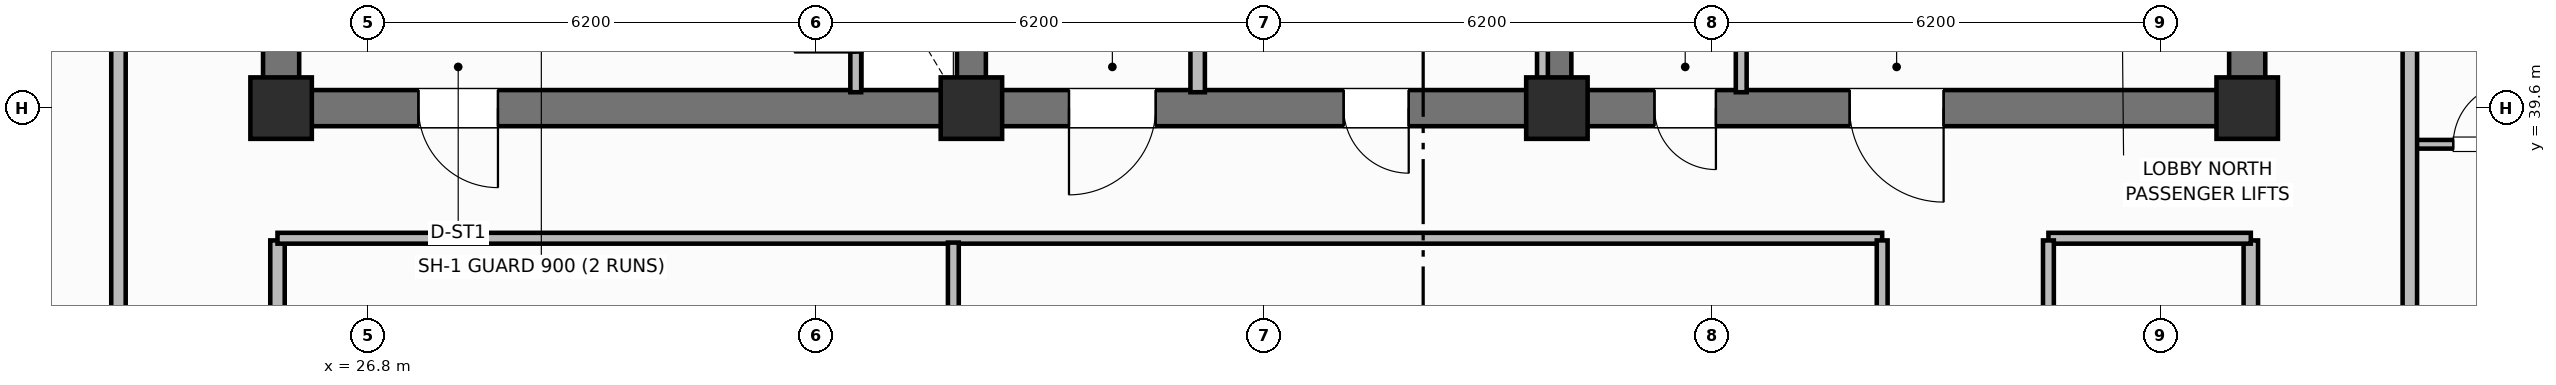
"""IFC4 building model, lengths in metres.
Left out: names, types, materials, properties, quantities, classifications, styles, units other than length and angle.
Written with IfcOpenShell. Run it as: python <this file> out.ifc"""

import sys

from ifc_helpers import new_model, si_unit, direction, frame, frame_2d, origin, origin_2d, place, context, subcontext, project, spatial, rectangle, extrude, element, fill, save


model = new_model("IFC4")
c1 = context("Model", 3, precision=1e-05, world=origin(), true_north=direction((0.0, 1.0)))
c2 = subcontext(c1, "Body", "Model", "MODEL_VIEW")
j1 = project(units=[si_unit("LENGTHUNIT", "METRE"), si_unit("PLANEANGLEUNIT", "RADIAN")], contexts=[c1])
p1 = place(None, origin())
s1 = spatial("IfcSite", under=j1, at=p1, CompositionType="ELEMENT")
p2 = place(p1, origin())
s2 = spatial("IfcBuilding", under=s1, at=p2, CompositionType="ELEMENT")
p3 = place(p2, frame((0.0, 0.0, 214.7)))
s3 = spatial("IfcBuildingStorey", under=s2, at=p3, CompositionType="ELEMENT", Elevation=214.7)
for number, where, z_axis, x_axis in (
    (1, (25.6, 39.85, 0.0), (0.0, 0.0, 1.0), (0.0, 1.0, 0.0)),
    (2, (52.8, 39.85, 0.0), (0.0, 0.0, 1.0), (0.0, 1.0, 0.0)),
):
    element("IfcWall", number, at=place(p3, frame(where, z_axis=z_axis, x_axis=x_axis)), inside=s3, PredefinedType="SHEAR", context=c2, shape_type="SweptSolid", body=[
        extrude(rectangle(XDim=5.7, YDim=0.5, at=frame_2d((2.85, 0.0))), origin(), (0.0, 0.0, 1.0), 3.7),
    ])
p4 = place(p3, frame((52.8, 39.6, 0.0), z_axis=(0.0, 0.0, 1.0), x_axis=(-1.0, 0.0, 0.0)))
e3 = element("IfcWall", 3, at=p4, inside=s3, PredefinedType="SHEAR", context=c2, shape_type="SweptSolid", body=[
    extrude(rectangle(XDim=27.2, YDim=0.5, at=frame_2d((13.6, 0.0))), origin(), (0.0, 0.0, 1.0), 3.7),
])
p5 = place(p4, frame((24.2, 0.0, 0.0)))
e4 = element("IfcOpeningElement", 4, at=p5, cuts=e3, PredefinedType="OPENING", context=c2, shape_type="SweptSolid", body=[
    extrude(rectangle(XDim=1.1, YDim=2.15, at=frame_2d((0.55, 1.075))), frame((0.0, 0.26, 0.0), z_axis=(0.0, -1.0, 0.0), x_axis=(1.0, 0.0, 0.0)), (0.0, 0.0, 1.0), 0.52),
])
p6 = place(p4, frame((15.1, 0.0, 0.0)))
e5 = element("IfcOpeningElement", 5, at=p6, cuts=e3, PredefinedType="OPENING", context=c2, shape_type="SweptSolid", body=[
    extrude(rectangle(XDim=1.2, YDim=2.15, at=frame_2d((0.6, 1.075))), frame((0.0, 0.26, 0.0), z_axis=(0.0, -1.0, 0.0), x_axis=(1.0, 0.0, 0.0)), (0.0, 0.0, 1.0), 0.52),
])
p7 = place(p4, frame((11.6, 0.0, 0.0)))
e6 = element("IfcOpeningElement", 6, at=p7, cuts=e3, PredefinedType="OPENING", context=c2, shape_type="SweptSolid", body=[
    extrude(rectangle(XDim=0.9, YDim=2.1, at=frame_2d((0.45, 1.05))), frame((0.0, 0.26, 0.0), z_axis=(0.0, -1.0, 0.0), x_axis=(1.0, 0.0, 0.0)), (0.0, 0.0, 1.0), 0.52),
])
p8 = place(p4, frame((7.35, 0.0, 0.0)))
e7 = element("IfcOpeningElement", 7, at=p8, cuts=e3, PredefinedType="OPENING", context=c2, shape_type="SweptSolid", body=[
    extrude(rectangle(XDim=0.85, YDim=2.1, at=frame_2d((0.425, 1.05))), frame((0.0, 0.26, 0.0), z_axis=(0.0, -1.0, 0.0), x_axis=(1.0, 0.0, 0.0)), (0.0, 0.0, 1.0), 0.52),
])
p9 = place(p4, frame((4.2, 0.0, 0.0)))
e8 = element("IfcOpeningElement", 8, at=p9, cuts=e3, PredefinedType="OPENING", context=c2, shape_type="SweptSolid", body=[
    extrude(rectangle(XDim=1.3, YDim=2.2, at=frame_2d((0.65, 1.1))), frame((0.0, 0.26, 0.0), z_axis=(0.0, -1.0, 0.0), x_axis=(1.0, 0.0, 0.0)), (0.0, 0.0, 1.0), 0.52),
])
for number, where, z_axis, x_axis in (
    (9, (35.15, 39.85, 0.0), (0.0, 0.0, 1.0), (0.0, 1.0, 0.0)),
    (10, (43.25, 39.85, 0.0), (0.0, 0.0, 1.0), (0.0, 1.0, 0.0)),
):
    element("IfcWall", number, at=place(p3, frame(where, z_axis=z_axis, x_axis=x_axis)), inside=s3, PredefinedType="SHEAR", context=c2, shape_type="SweptSolid", body=[
        extrude(rectangle(XDim=5.7, YDim=0.4, at=frame_2d((2.85, 0.0))), origin(), (0.0, 0.0, 1.0), 3.7),
    ])
for number, where, z_axis, x_axis in (
    (11, (25.6, 39.6, 0.0), (0.0, 0.0, 1.0), (1.0, 0.0, 0.0)),
    (12, (35.15, 39.6, 0.0), (0.0, 0.0, 1.0), (1.0, 0.0, 0.0)),
    (13, (43.25, 39.6, 0.0), (0.0, 0.0, 1.0), (1.0, 0.0, 0.0)),
    (14, (52.8, 39.6, 0.0), (0.0, 0.0, 1.0), (1.0, 0.0, 0.0)),
):
    element("IfcColumn", number, at=place(p3, frame(where, z_axis=z_axis, x_axis=x_axis)), inside=s3, PredefinedType="COLUMN", context=c2, shape_type="SweptSolid", body=[
        extrude(rectangle(XDim=0.85, YDim=0.85, at=origin_2d()), origin(), (0.0, 0.0, 1.0), 3.7),
    ])
p10 = place(p3, frame((33.55, 39.82, 0.0), z_axis=(0.0, 0.0, 1.0), x_axis=(0.0, 1.0, 0.0)))
e15 = element("IfcWall", 15, at=p10, inside=s3, PredefinedType="PARTITIONING", context=c2, shape_type="SweptSolid", body=[
    extrude(rectangle(XDim=2.13, YDim=0.15, at=frame_2d((1.065, 0.0))), origin(), (0.0, 0.0, 1.0), 2.55),
])
p11 = place(p10, frame((0.55, 0.0, 0.0)))
e16 = element("IfcOpeningElement", 16, at=p11, cuts=e15, PredefinedType="OPENING", context=c2, shape_type="SweptSolid", body=[
    extrude(rectangle(XDim=0.85, YDim=2.05, at=frame_2d((0.425, 1.025))), frame((0.0, 0.085, 0.0), z_axis=(0.0, -1.0, 0.0), x_axis=(1.0, 0.0, 0.0)), (0.0, 0.0, 1.0), 0.17),
])
p12 = place(p3, frame((38.28, 39.82, 0.0), z_axis=(0.0, 0.0, 1.0), x_axis=(0.0, 1.0, 0.0)))
e17 = element("IfcWall", 17, at=p12, inside=s3, PredefinedType="PARTITIONING", context=c2, shape_type="SweptSolid", body=[
    extrude(rectangle(XDim=5.63, YDim=0.2, at=frame_2d((2.815, 0.0))), origin(), (0.0, 0.0, 1.0), 2.55),
])
for number, where, z_axis, x_axis in (
    (18, (43.05, 39.82, 0.0), (0.0, 0.0, 1.0), (0.0, 1.0, 0.0)),
    (19, (45.8, 39.82, 0.0), (0.0, 0.0, 1.0), (0.0, 1.0, 0.0)),
):
    element("IfcWall", number, at=place(p3, frame(where, z_axis=z_axis, x_axis=x_axis)), inside=s3, PredefinedType="PARTITIONING", context=c2, shape_type="SweptSolid", body=[
        extrude(rectangle(XDim=5.63, YDim=0.15, at=frame_2d((2.815, 0.0))), origin(), (0.0, 0.0, 1.0), 2.55),
    ])
for number, where, z_axis, x_axis in (
    (20, (25.55, 18.63, 0.0), (0.0, 0.0, 1.0), (0.0, 1.0, 0.0)),
    (21, (52.85, 18.63, 0.0), (0.0, 0.0, 1.0), (0.0, 1.0, 0.0)),
):
    element("IfcWall", number, at=place(p3, frame(where, z_axis=z_axis, x_axis=x_axis)), inside=s3, PredefinedType="PARTITIONING", context=c2, shape_type="SweptSolid", body=[
        extrude(rectangle(XDim=19.14, YDim=0.2, at=frame_2d((9.57, 0.0))), origin(), (0.0, 0.0, 1.0), 2.55),
    ])
p13 = place(p3, frame((25.55, 37.8, 0.0), z_axis=(0.0, 0.0, 1.0), x_axis=(1.0, 0.0, 0.0)))
e22 = element("IfcWall", 22, at=p13, inside=s3, PredefinedType="PARTITIONING", context=c2, shape_type="SweptSolid", body=[
    extrude(rectangle(XDim=22.2, YDim=0.15, at=frame_2d((11.1, 0.0))), origin(), (0.0, 0.0, 1.0), 2.55),
])
p14 = place(p3, frame((50.05, 37.8, 0.0), z_axis=(0.0, 0.0, 1.0), x_axis=(1.0, 0.0, 0.0)))
e23 = element("IfcWall", 23, at=p14, inside=s3, PredefinedType="PARTITIONING", context=c2, shape_type="SweptSolid", body=[
    extrude(rectangle(XDim=2.8, YDim=0.15, at=frame_2d((1.4, 0.0))), origin(), (0.0, 0.0, 1.0), 2.55),
])
p15 = place(p3, frame((34.9, 18.66, 0.0), z_axis=(0.0, 0.0, 1.0), x_axis=(0.0, 1.0, 0.0)))
e24 = element("IfcWall", 24, at=p15, inside=s3, PredefinedType="PARTITIONING", context=c2, shape_type="SweptSolid", body=[
    extrude(rectangle(XDim=19.08, YDim=0.15, at=frame_2d((9.54, 0.0))), origin(), (0.0, 0.0, 1.0), 2.55),
])
p16 = place(p15, frame((5.0, 0.0, 0.0)))
e25 = element("IfcOpeningElement", 25, at=p16, cuts=e24, PredefinedType="OPENING", context=c2, shape_type="SweptSolid", body=[
    extrude(rectangle(XDim=1.0, YDim=2.15, at=frame_2d((0.5, 1.075))), frame((0.0, 0.085, 0.0), z_axis=(0.0, -1.0, 0.0), x_axis=(1.0, 0.0, 0.0)), (0.0, 0.0, 1.0), 0.17),
])
p17 = place(p3, frame((47.75, 18.63, 0.0), z_axis=(0.0, 0.0, 1.0), x_axis=(0.0, 1.0, 0.0)))
e26 = element("IfcWall", 26, at=p17, inside=s3, PredefinedType="PARTITIONING", context=c2, shape_type="SweptSolid", body=[
    extrude(rectangle(XDim=19.14, YDim=0.15, at=frame_2d((9.57, 0.0))), origin(), (0.0, 0.0, 1.0), 2.55),
])
p18 = place(p17, frame((2.4, 0.0, 0.0)))
e27 = element("IfcOpeningElement", 27, at=p18, cuts=e26, PredefinedType="OPENING", context=c2, shape_type="SweptSolid", body=[
    extrude(rectangle(XDim=0.9, YDim=2.1, at=frame_2d((0.45, 1.05))), frame((0.0, 0.085, 0.0), z_axis=(0.0, -1.0, 0.0), x_axis=(1.0, 0.0, 0.0)), (0.0, 0.0, 1.0), 0.17),
])
p19 = place(p17, frame((9.847, 0.0, 0.0)))
e28 = element("IfcOpeningElement", 28, at=p19, cuts=e26, PredefinedType="OPENING", context=c2, shape_type="SweptSolid", body=[
    extrude(rectangle(XDim=0.9, YDim=2.1, at=frame_2d((0.45, 1.05))), frame((0.0, 0.085, 0.0), z_axis=(0.0, -1.0, 0.0), x_axis=(1.0, 0.0, 0.0)), (0.0, 0.0, 1.0), 0.17),
])
p20 = place(p3, frame((50.05, 18.63, 0.0), z_axis=(0.0, 0.0, 1.0), x_axis=(0.0, 1.0, 0.0)))
e29 = element("IfcWall", 29, at=p20, inside=s3, PredefinedType="PARTITIONING", context=c2, shape_type="SweptSolid", body=[
    extrude(rectangle(XDim=19.14, YDim=0.15, at=frame_2d((9.57, 0.0))), origin(), (0.0, 0.0, 1.0), 2.55),
])
p21 = place(p20, frame((2.2, 0.0, 0.0)))
e30 = element("IfcOpeningElement", 30, at=p21, cuts=e29, PredefinedType="OPENING", context=c2, shape_type="SweptSolid", body=[
    extrude(rectangle(XDim=1.0, YDim=2.15, at=frame_2d((0.5, 1.075))), frame((0.0, 0.085, 0.0), z_axis=(0.0, -1.0, 0.0), x_axis=(1.0, 0.0, 0.0)), (0.0, 0.0, 1.0), 0.17),
])
p22 = place(p20, frame((9.847, 0.0, 0.0)))
e31 = element("IfcOpeningElement", 31, at=p22, cuts=e29, PredefinedType="OPENING", context=c2, shape_type="SweptSolid", body=[
    extrude(rectangle(XDim=1.0, YDim=2.15, at=frame_2d((0.5, 1.075))), frame((0.0, 0.085, 0.0), z_axis=(0.0, -1.0, 0.0), x_axis=(1.0, 0.0, 0.0)), (0.0, 0.0, 1.0), 0.17),
])
p23 = place(p3, frame((23.35, 10.6, 0.0), z_axis=(0.0, 0.0, 1.0), x_axis=(0.0, 1.0, 0.0)))
e32 = element("IfcWall", 32, at=p23, inside=s3, PredefinedType="PARTITIONING", context=c2, shape_type="SweptSolid", body=[
    extrude(rectangle(XDim=35.2, YDim=0.2, at=frame_2d((17.6, 0.0))), origin(), (0.0, 0.0, 1.0), 2.55),
])
p24 = place(p23, frame((2.65, 0.0, 0.0)))
e33 = element("IfcOpeningElement", 33, at=p24, cuts=e32, PredefinedType="OPENING", context=c2, shape_type="SweptSolid", body=[
    extrude(rectangle(XDim=1.0, YDim=2.15, at=frame_2d((0.5, 1.075))), frame((0.0, 0.11, 0.0), z_axis=(0.0, -1.0, 0.0), x_axis=(1.0, 0.0, 0.0)), (0.0, 0.0, 1.0), 0.22),
])
p25 = place(p23, frame((19.79, 0.0, 0.0)))
e34 = element("IfcOpeningElement", 34, at=p25, cuts=e32, PredefinedType="OPENING", context=c2, shape_type="SweptSolid", body=[
    extrude(rectangle(XDim=1.0, YDim=2.15, at=frame_2d((0.5, 1.075))), frame((0.0, 0.11, 0.0), z_axis=(0.0, -1.0, 0.0), x_axis=(1.0, 0.0, 0.0)), (0.0, 0.0, 1.0), 0.22),
])
p26 = place(p3, frame((55.05, 39.1, 0.0), z_axis=(0.0, 0.0, 1.0), x_axis=(1.0, 0.0, 0.0)))
e35 = element("IfcWall", 35, at=p26, inside=s3, PredefinedType="PARTITIONING", context=c2, shape_type="SweptSolid", body=[
    extrude(rectangle(XDim=2.25, YDim=0.12, at=frame_2d((1.125, 0.0))), origin(), (0.0, 0.0, 1.0), 2.55),
])
p27 = place(p26, frame((0.6, 0.0, 0.0)))
e36 = element("IfcOpeningElement", 36, at=p27, cuts=e35, PredefinedType="OPENING", context=c2, shape_type="SweptSolid", body=[
    extrude(rectangle(XDim=0.85, YDim=2.1, at=frame_2d((0.425, 1.05))), frame((0.0, 0.07, 0.0), z_axis=(0.0, -1.0, 0.0), x_axis=(1.0, 0.0, 0.0)), (0.0, 0.0, 1.0), 0.14),
])
p28 = place(p3, frame((55.05, 10.6, 0.0), z_axis=(0.0, 0.0, 1.0), x_axis=(0.0, 1.0, 0.0)))
e37 = element("IfcWall", 37, at=p28, inside=s3, PredefinedType="PARTITIONING", context=c2, shape_type="SweptSolid", body=[
    extrude(rectangle(XDim=35.2, YDim=0.2, at=frame_2d((17.6, 0.0))), origin(), (0.0, 0.0, 1.0), 2.55),
])
p29 = place(p28, frame((2.65, 0.0, 0.0)))
e38 = element("IfcOpeningElement", 38, at=p29, cuts=e37, PredefinedType="OPENING", context=c2, shape_type="SweptSolid", body=[
    extrude(rectangle(XDim=1.0, YDim=2.15, at=frame_2d((0.5, 1.075))), frame((0.0, 0.11, 0.0), z_axis=(0.0, -1.0, 0.0), x_axis=(1.0, 0.0, 0.0)), (0.0, 0.0, 1.0), 0.22),
])
p30 = place(p28, frame((12.166, 0.0, 0.0)))
e39 = element("IfcOpeningElement", 39, at=p30, cuts=e37, PredefinedType="OPENING", context=c2, shape_type="SweptSolid", body=[
    extrude(rectangle(XDim=1.0, YDim=2.15, at=frame_2d((0.5, 1.075))), frame((0.0, 0.11, 0.0), z_axis=(0.0, -1.0, 0.0), x_axis=(1.0, 0.0, 0.0)), (0.0, 0.0, 1.0), 0.22),
])
p31 = place(p28, frame((23.65, 0.0, 0.0)))
e40 = element("IfcOpeningElement", 40, at=p31, cuts=e37, PredefinedType="OPENING", context=c2, shape_type="SweptSolid", body=[
    extrude(rectangle(XDim=1.0, YDim=2.15, at=frame_2d((0.5, 1.075))), frame((0.0, 0.11, 0.0), z_axis=(0.0, -1.0, 0.0), x_axis=(1.0, 0.0, 0.0)), (0.0, 0.0, 1.0), 0.22),
])
p32 = place(p11, origin())
e41 = element("IfcDoor", 41, at=p32, inside=s3, OperationType="SINGLE_SWING_LEFT", PredefinedType="TRAPDOOR", context=c2, shape_type="SweptSolid", body=[
    extrude(rectangle(XDim=0.85, YDim=2.05, at=frame_2d((0.425, 1.025))), frame((0.0, 0.025, 0.0), z_axis=(0.0, -1.0, 0.0), x_axis=(1.0, 0.0, 0.0)), (0.0, 0.0, 1.0), 0.05),
])
fill(e16, e41)
p33 = place(p27, origin())
e42 = element("IfcDoor", 42, at=p33, inside=s3, OperationType="SINGLE_SWING_RIGHT", PredefinedType="DOOR", context=c2, shape_type="SweptSolid", body=[
    extrude(rectangle(XDim=0.85, YDim=2.1, at=frame_2d((0.425, 1.05))), frame((0.0, 0.025, 0.0), z_axis=(0.0, -1.0, 0.0), x_axis=(1.0, 0.0, 0.0)), (0.0, 0.0, 1.0), 0.05),
])
fill(e36, e42)
p34 = place(p5, origin())
e43 = element("IfcDoor", 43, at=p34, inside=s3, OperationType="SINGLE_SWING_LEFT", PredefinedType="DOOR", context=c2, shape_type="SweptSolid", body=[
    extrude(rectangle(XDim=1.1, YDim=2.15, at=frame_2d((0.55, 1.075))), frame((0.0, 0.025, 0.0), z_axis=(0.0, -1.0, 0.0), x_axis=(1.0, 0.0, 0.0)), (0.0, 0.0, 1.0), 0.05),
])
fill(e4, e43)
p35 = place(p6, origin())
e44 = element("IfcDoor", 44, at=p35, inside=s3, OperationType="SINGLE_SWING_RIGHT", PredefinedType="DOOR", context=c2, shape_type="SweptSolid", body=[
    extrude(rectangle(XDim=1.2, YDim=2.15, at=frame_2d((0.6, 1.075))), frame((0.0, 0.025, 0.0), z_axis=(0.0, -1.0, 0.0), x_axis=(1.0, 0.0, 0.0)), (0.0, 0.0, 1.0), 0.05),
])
fill(e5, e44)
p36 = place(p7, origin())
e45 = element("IfcDoor", 45, at=p36, inside=s3, OperationType="SINGLE_SWING_LEFT", PredefinedType="DOOR", context=c2, shape_type="SweptSolid", body=[
    extrude(rectangle(XDim=0.9, YDim=2.1, at=frame_2d((0.45, 1.05))), frame((0.0, 0.025, 0.0), z_axis=(0.0, -1.0, 0.0), x_axis=(1.0, 0.0, 0.0)), (0.0, 0.0, 1.0), 0.05),
])
fill(e6, e45)
p37 = place(p8, origin())
e46 = element("IfcDoor", 46, at=p37, inside=s3, OperationType="SINGLE_SWING_LEFT", PredefinedType="DOOR", context=c2, shape_type="SweptSolid", body=[
    extrude(rectangle(XDim=0.85, YDim=2.1, at=frame_2d((0.425, 1.05))), frame((0.0, 0.025, 0.0), z_axis=(0.0, -1.0, 0.0), x_axis=(1.0, 0.0, 0.0)), (0.0, 0.0, 1.0), 0.05),
])
fill(e7, e46)
p38 = place(p9, origin())
e47 = element("IfcDoor", 47, at=p38, inside=s3, OperationType="SINGLE_SWING_LEFT", PredefinedType="DOOR", context=c2, shape_type="SweptSolid", body=[
    extrude(rectangle(XDim=1.3, YDim=2.2, at=frame_2d((0.65, 1.1))), frame((0.0, 0.025, 0.0), z_axis=(0.0, -1.0, 0.0), x_axis=(1.0, 0.0, 0.0)), (0.0, 0.0, 1.0), 0.05),
])
fill(e8, e47)
save(model, sys.argv[1])
